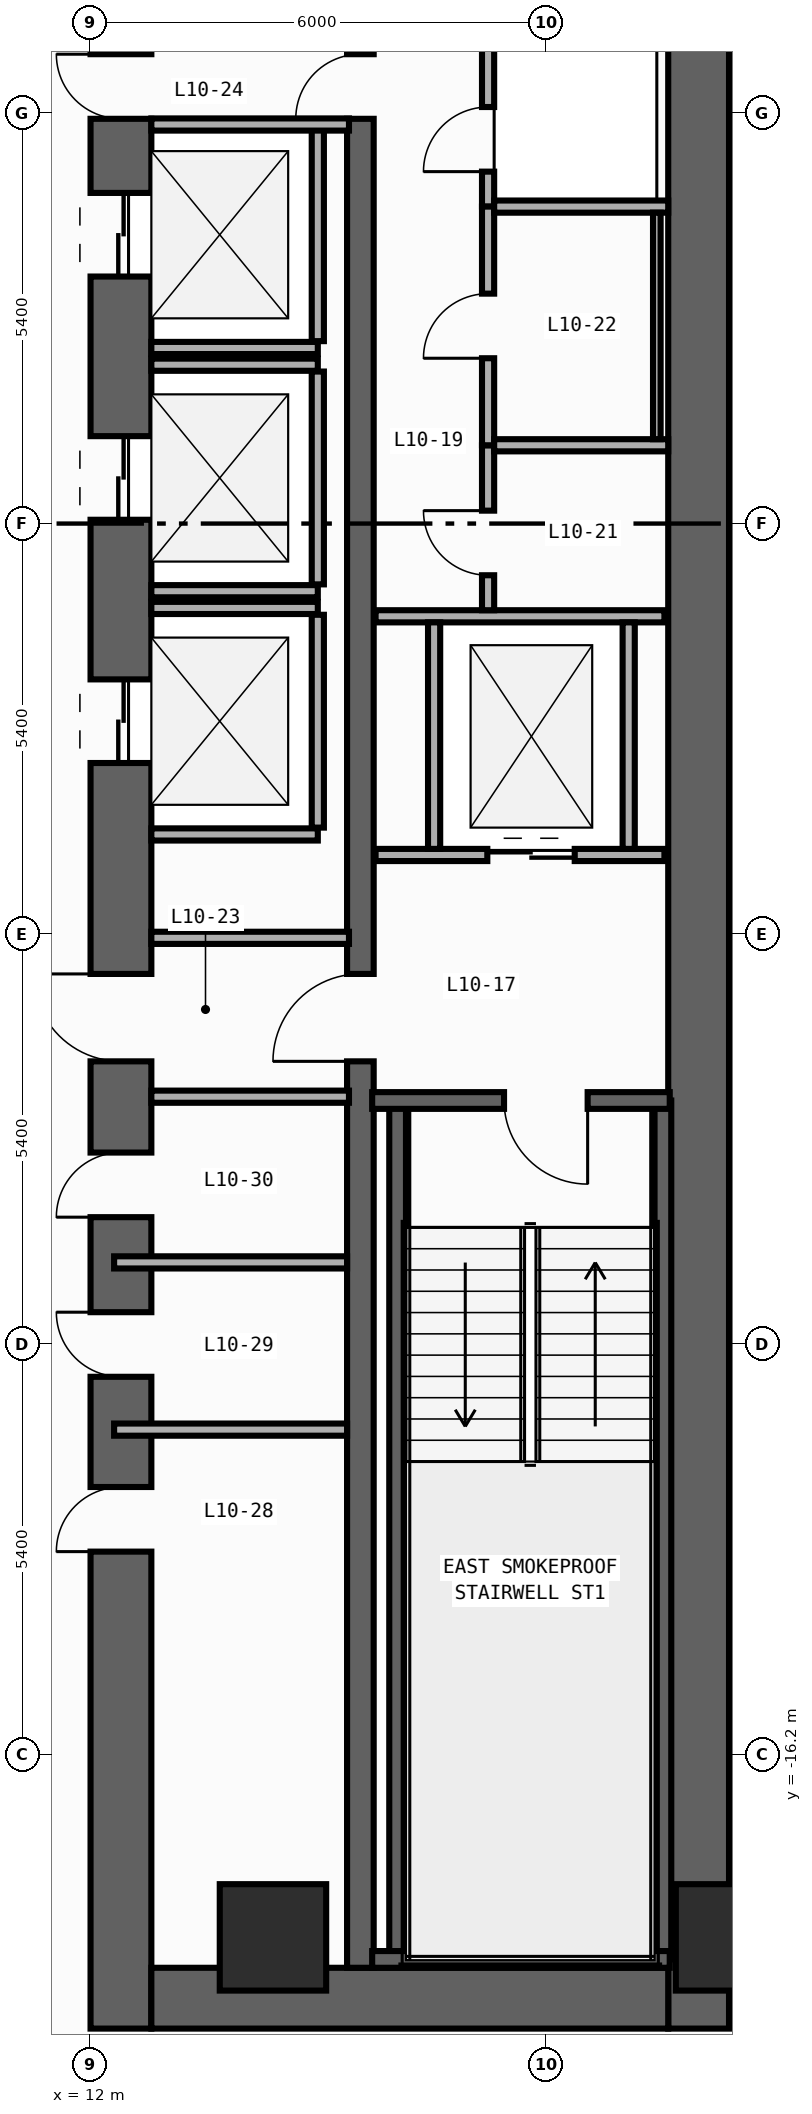
"""IFC4 building model, lengths in metres.
Left out: names, types, materials, properties, quantities, classifications, styles, units other than length and angle.
Written with IfcOpenShell. Run it as: python <this file> out.ifc"""

import sys

from ifc_helpers import new_model, si_unit, direction, frame, frame_2d, origin, origin_2d, place, context, subcontext, project, spatial, rectangle, extrude, element, fill, save


model = new_model("IFC4")
c1 = context("Model", 3, precision=1e-05, world=origin(), true_north=direction((0.0, 1.0)))
c2 = subcontext(c1, "Body", "Model", "MODEL_VIEW")
j1 = project(units=[si_unit("LENGTHUNIT", "METRE"), si_unit("PLANEANGLEUNIT", "RADIAN")], contexts=[c1])
p1 = place(None, origin())
s1 = spatial("IfcSite", under=j1, at=p1, CompositionType="ELEMENT")
p2 = place(p1, origin())
s2 = spatial("IfcBuilding", under=s1, at=p2, CompositionType="ELEMENT")
p3 = place(p2, frame((0.0, 0.0, 42.8)))
s3 = spatial("IfcBuildingStorey", under=s2, at=p3, CompositionType="ELEMENT", Elevation=42.8)
p4 = place(p3, frame((12.4, -19.8, 0.0), z_axis=(0.0, 0.0, 1.0), x_axis=(0.0, 1.0, 0.0)))
e1 = element("IfcWall", 1, at=p4, inside=s3, PredefinedType="SHEAR", context=c2, shape_type="SweptSolid", body=[
    extrude(rectangle(XDim=27.0, YDim=0.8, at=frame_2d((13.5, 0.0))), origin(), (0.0, 0.0, 1.0), 3.94),
])
p5 = place(p4, frame((23.05, 0.0, 0.0)))
e2 = element("IfcOpeningElement", 2, at=p5, cuts=e1, PredefinedType="OPENING", context=c2, shape_type="SweptSolid", body=[
    extrude(rectangle(XDim=1.1, YDim=2.2, at=frame_2d((0.55, 1.1))), frame((0.0, 0.41, 0.0), z_axis=(0.0, -1.0, 0.0), x_axis=(1.0, 0.0, 0.0)), (0.0, 0.0, 1.0), 0.82),
])
p6 = place(p4, frame((19.85, 0.0, 0.0)))
e3 = element("IfcOpeningElement", 3, at=p6, cuts=e1, PredefinedType="OPENING", context=c2, shape_type="SweptSolid", body=[
    extrude(rectangle(XDim=1.1, YDim=2.2, at=frame_2d((0.55, 1.1))), frame((0.0, 0.41, 0.0), z_axis=(0.0, -1.0, 0.0), x_axis=(1.0, 0.0, 0.0)), (0.0, 0.0, 1.0), 0.82),
])
p7 = place(p4, frame((16.65, 0.0, 0.0)))
e4 = element("IfcOpeningElement", 4, at=p7, cuts=e1, PredefinedType="OPENING", context=c2, shape_type="SweptSolid", body=[
    extrude(rectangle(XDim=1.1, YDim=2.2, at=frame_2d((0.55, 1.1))), frame((0.0, 0.41, 0.0), z_axis=(0.0, -1.0, 0.0), x_axis=(1.0, 0.0, 0.0)), (0.0, 0.0, 1.0), 0.82),
])
p8 = place(p4, frame((6.275, 0.0, 0.0)))
e5 = element("IfcOpeningElement", 5, at=p8, cuts=e1, PredefinedType="OPENING", context=c2, shape_type="SweptSolid", body=[
    extrude(rectangle(XDim=0.85, YDim=2.1, at=frame_2d((0.425, 1.05))), frame((0.0, 0.41, 0.0), z_axis=(0.0, -1.0, 0.0), x_axis=(1.0, 0.0, 0.0)), (0.0, 0.0, 1.0), 0.82),
])
p9 = place(p4, frame((8.575, 0.0, 0.0)))
e6 = element("IfcOpeningElement", 6, at=p9, cuts=e1, PredefinedType="OPENING", context=c2, shape_type="SweptSolid", body=[
    extrude(rectangle(XDim=0.85, YDim=2.1, at=frame_2d((0.425, 1.05))), frame((0.0, 0.41, 0.0), z_axis=(0.0, -1.0, 0.0), x_axis=(1.0, 0.0, 0.0)), (0.0, 0.0, 1.0), 0.82),
])
p10 = place(p4, frame((10.675, 0.0, 0.0)))
e7 = element("IfcOpeningElement", 7, at=p10, cuts=e1, PredefinedType="OPENING", context=c2, shape_type="SweptSolid", body=[
    extrude(rectangle(XDim=0.85, YDim=2.1, at=frame_2d((0.425, 1.05))), frame((0.0, 0.41, 0.0), z_axis=(0.0, -1.0, 0.0), x_axis=(1.0, 0.0, 0.0)), (0.0, 0.0, 1.0), 0.82),
])
p11 = place(p4, frame((12.725, 0.0, 0.0)))
e8 = element("IfcOpeningElement", 8, at=p11, cuts=e1, PredefinedType="OPENING", context=c2, shape_type="SweptSolid", body=[
    extrude(rectangle(XDim=1.15, YDim=2.2, at=frame_2d((0.575, 1.1))), frame((0.0, 0.41, 0.0), z_axis=(0.0, -1.0, 0.0), x_axis=(1.0, 0.0, 0.0)), (0.0, 0.0, 1.0), 0.82),
])
p12 = place(p4, frame((25.125, 0.0, 0.0)))
e9 = element("IfcOpeningElement", 9, at=p12, cuts=e1, PredefinedType="OPENING", context=c2, shape_type="SweptSolid", body=[
    extrude(rectangle(XDim=0.85, YDim=2.1, at=frame_2d((0.425, 1.05))), frame((0.0, 0.41, 0.0), z_axis=(0.0, -1.0, 0.0), x_axis=(1.0, 0.0, 0.0)), (0.0, 0.0, 1.0), 0.82),
])
p13 = place(p3, frame((20.0, -19.8, 0.0), z_axis=(0.0, 0.0, 1.0), x_axis=(0.0, 1.0, 0.0)))
e10 = element("IfcWall", 10, at=p13, inside=s3, PredefinedType="SHEAR", context=c2, shape_type="SweptSolid", body=[
    extrude(rectangle(XDim=27.0, YDim=0.8, at=frame_2d((13.5, 0.0))), origin(), (0.0, 0.0, 1.0), 3.94),
])
p14 = place(p3, frame((12.8, -19.4, 0.0), z_axis=(0.0, 0.0, 1.0), x_axis=(1.0, 0.0, 0.0)))
e11 = element("IfcWall", 11, at=p14, inside=s3, PredefinedType="SHEAR", context=c2, shape_type="SweptSolid", body=[
    extrude(rectangle(XDim=6.8, YDim=0.8, at=frame_2d((3.4, 0.0))), origin(), (0.0, 0.0, 1.0), 3.94),
])
p15 = place(p3, frame((15.55, -19.0, 0.0), z_axis=(0.0, 0.0, 1.0), x_axis=(0.0, 1.0, 0.0)))
e12 = element("IfcWall", 12, at=p15, inside=s3, PredefinedType="SHEAR", context=c2, shape_type="SweptSolid", body=[
    extrude(rectangle(XDim=25.4, YDim=0.35, at=frame_2d((12.7, 0.0))), origin(), (0.0, 0.0, 1.0), 3.94),
])
p16 = place(p15, frame((11.925, 0.0, 0.0)))
e13 = element("IfcOpeningElement", 13, at=p16, cuts=e12, PredefinedType="OPENING", context=c2, shape_type="SweptSolid", body=[
    extrude(rectangle(XDim=1.15, YDim=2.2, at=frame_2d((0.575, 1.1))), frame((0.0, 0.185, 0.0), z_axis=(0.0, -1.0, 0.0), x_axis=(1.0, 0.0, 0.0)), (0.0, 0.0, 1.0), 0.37),
])
p17 = place(p15, frame((24.325, 0.0, 0.0)))
e14 = element("IfcOpeningElement", 14, at=p17, cuts=e12, PredefinedType="OPENING", context=c2, shape_type="SweptSolid", body=[
    extrude(rectangle(XDim=0.85, YDim=2.1, at=frame_2d((0.425, 1.05))), frame((0.0, 0.185, 0.0), z_axis=(0.0, -1.0, 0.0), x_axis=(1.0, 0.0, 0.0)), (0.0, 0.0, 1.0), 0.37),
])
for number, where, z_axis, x_axis in (
    (15, (16.04, -18.89, 0.0), (0.0, 0.0, 1.0), (0.0, 1.0, 0.0)),
    (16, (19.53, -18.89, 0.0), (0.0, 0.0, 1.0), (0.0, 1.0, 0.0)),
):
    element("IfcWall", number, at=place(p3, frame(where, z_axis=z_axis, x_axis=x_axis)), inside=s3, PredefinedType="SHEAR", context=c2, shape_type="SweptSolid", body=[
        extrude(rectangle(XDim=11.3, YDim=0.22, at=frame_2d((5.65, 0.0))), origin(), (0.0, 0.0, 1.0), 3.94),
    ])
p18 = place(p3, frame((15.705, -18.89, 0.0), z_axis=(0.0, 0.0, 1.0), x_axis=(1.0, 0.0, 0.0)))
e17 = element("IfcWall", 17, at=p18, inside=s3, PredefinedType="SHEAR", context=c2, shape_type="SweptSolid", body=[
    extrude(rectangle(XDim=3.915, YDim=0.22, at=frame_2d((1.958, 0.0))), origin(), (0.0, 0.0, 1.0), 3.94),
])
p19 = place(p3, frame((19.62, -7.59, 0.0), z_axis=(0.0, 0.0, 1.0), x_axis=(-1.0, 0.0, 0.0)))
e18 = element("IfcWall", 18, at=p19, inside=s3, PredefinedType="SHEAR", context=c2, shape_type="SweptSolid", body=[
    extrude(rectangle(XDim=3.915, YDim=0.22, at=frame_2d((1.958, 0.0))), origin(), (0.0, 0.0, 1.0), 3.94),
])
p20 = place(p19, frame((1.08, 0.0, 0.0)))
e19 = element("IfcOpeningElement", 19, at=p20, cuts=e18, PredefinedType="OPENING", context=c2, shape_type="SweptSolid", body=[
    extrude(rectangle(XDim=1.1, YDim=2.2, at=frame_2d((0.55, 1.1))), frame((0.0, 0.12, 0.0), z_axis=(0.0, -1.0, 0.0), x_axis=(1.0, 0.0, 0.0)), (0.0, 0.0, 1.0), 0.24),
])
for number, where, z_axis, x_axis in (
    (20, (20.4, -18.6, 0.0), (0.0, 0.0, 1.0), (1.0, 0.0, 0.0)),
    (21, (14.4, -18.6, 0.0), (0.0, 0.0, 1.0), (1.0, 0.0, 0.0)),
):
    element("IfcColumn", number, at=place(p3, frame(where, z_axis=z_axis, x_axis=x_axis)), inside=s3, PredefinedType="COLUMN", context=c2, shape_type="SweptSolid", body=[
        extrude(rectangle(XDim=1.4, YDim=1.4, at=origin_2d()), origin(), (0.0, 0.0, 1.0), 4.2),
    ])
p21 = place(p3, frame((12.8, 2.31, 0.0), z_axis=(0.0, 0.0, 1.0), x_axis=(1.0, 0.0, 0.0)))
e22 = element("IfcWall", 22, at=p21, inside=s3, PredefinedType="STANDARD", context=c2, shape_type="SweptSolid", body=[
    extrude(rectangle(XDim=2.19, YDim=0.16, at=frame_2d((1.095, 0.0))), origin(), (0.0, 0.0, 1.0), 3.94),
])
p22 = place(p3, frame((14.99, 2.4, 0.0), z_axis=(0.0, 0.0, 1.0), x_axis=(0.0, 1.0, 0.0)))
e23 = element("IfcWall", 23, at=p22, inside=s3, PredefinedType="STANDARD", context=c2, shape_type="SweptSolid", body=[
    extrude(rectangle(XDim=2.8, YDim=0.16, at=frame_2d((1.4, 0.0))), origin(), (0.0, 0.0, 1.0), 3.94),
])
for number, where, z_axis, x_axis in (
    (24, (12.8, -0.89, 0.0), (0.0, 0.0, 1.0), (1.0, 0.0, 0.0)),
    (25, (12.8, 2.09, 0.0), (0.0, 0.0, 1.0), (1.0, 0.0, 0.0)),
):
    element("IfcWall", number, at=place(p3, frame(where, z_axis=z_axis, x_axis=x_axis)), inside=s3, PredefinedType="STANDARD", context=c2, shape_type="SweptSolid", body=[
        extrude(rectangle(XDim=2.19, YDim=0.16, at=frame_2d((1.095, 0.0))), origin(), (0.0, 0.0, 1.0), 3.94),
    ])
p23 = place(p3, frame((14.99, -0.8, 0.0), z_axis=(0.0, 0.0, 1.0), x_axis=(0.0, 1.0, 0.0)))
e26 = element("IfcWall", 26, at=p23, inside=s3, PredefinedType="STANDARD", context=c2, shape_type="SweptSolid", body=[
    extrude(rectangle(XDim=2.8, YDim=0.16, at=frame_2d((1.4, 0.0))), origin(), (0.0, 0.0, 1.0), 3.94),
])
for number, where, z_axis, x_axis in (
    (27, (12.8, -4.09, 0.0), (0.0, 0.0, 1.0), (1.0, 0.0, 0.0)),
    (28, (12.8, -1.11, 0.0), (0.0, 0.0, 1.0), (1.0, 0.0, 0.0)),
):
    element("IfcWall", number, at=place(p3, frame(where, z_axis=z_axis, x_axis=x_axis)), inside=s3, PredefinedType="STANDARD", context=c2, shape_type="SweptSolid", body=[
        extrude(rectangle(XDim=2.19, YDim=0.16, at=frame_2d((1.095, 0.0))), origin(), (0.0, 0.0, 1.0), 3.94),
    ])
p24 = place(p3, frame((14.99, -4.0, 0.0), z_axis=(0.0, 0.0, 1.0), x_axis=(0.0, 1.0, 0.0)))
e29 = element("IfcWall", 29, at=p24, inside=s3, PredefinedType="STANDARD", context=c2, shape_type="SweptSolid", body=[
    extrude(rectangle(XDim=2.8, YDim=0.16, at=frame_2d((1.4, 0.0))), origin(), (0.0, 0.0, 1.0), 3.94),
])
p25 = place(p3, frame((15.75, -4.36, 0.0), z_axis=(0.0, 0.0, 1.0), x_axis=(1.0, 0.0, 0.0)))
e30 = element("IfcWall", 30, at=p25, inside=s3, PredefinedType="STANDARD", context=c2, shape_type="SweptSolid", body=[
    extrude(rectangle(XDim=3.8, YDim=0.16, at=frame_2d((1.9, 0.0))), origin(), (0.0, 0.0, 1.0), 3.94),
])
p26 = place(p25, frame((1.47, 0.0, 0.0)))
e31 = element("IfcOpeningElement", 31, at=p26, cuts=e30, PredefinedType="OPENING", context=c2, shape_type="SweptSolid", body=[
    extrude(rectangle(XDim=1.15, YDim=2.2, at=frame_2d((0.575, 1.1))), frame((0.0, 0.09, 0.0), z_axis=(0.0, -1.0, 0.0), x_axis=(1.0, 0.0, 0.0)), (0.0, 0.0, 1.0), 0.18),
])
p27 = place(p3, frame((15.75, -1.22, 0.0), z_axis=(0.0, 0.0, 1.0), x_axis=(1.0, 0.0, 0.0)))
e32 = element("IfcWall", 32, at=p27, inside=s3, PredefinedType="STANDARD", context=c2, shape_type="SweptSolid", body=[
    extrude(rectangle(XDim=3.8, YDim=0.16, at=frame_2d((1.9, 0.0))), origin(), (0.0, 0.0, 1.0), 3.94),
])
for number, where, z_axis, x_axis in (
    (33, (16.52, -4.28, 0.0), (0.0, 0.0, 1.0), (0.0, 1.0, 0.0)),
    (34, (19.08, -4.28, 0.0), (0.0, 0.0, 1.0), (0.0, 1.0, 0.0)),
):
    element("IfcWall", number, at=place(p3, frame(where, z_axis=z_axis, x_axis=x_axis)), inside=s3, PredefinedType="STANDARD", context=c2, shape_type="SweptSolid", body=[
        extrude(rectangle(XDim=2.98, YDim=0.16, at=frame_2d((1.49, 0.0))), origin(), (0.0, 0.0, 1.0), 3.94),
    ])
for number, where, z_axis, x_axis in (
    (35, (12.8, -5.45, 0.0), (0.0, 0.0, 1.0), (1.0, 0.0, 0.0)),
    (36, (12.8, -7.54, 0.0), (0.0, 0.0, 1.0), (1.0, 0.0, 0.0)),
    (37, (12.8, 5.25, 0.0), (0.0, 0.0, 1.0), (1.0, 0.0, 0.0)),
):
    element("IfcWall", number, at=place(p3, frame(where, z_axis=z_axis, x_axis=x_axis)), inside=s3, PredefinedType="STANDARD", context=c2, shape_type="SweptSolid", body=[
        extrude(rectangle(XDim=2.6, YDim=0.16, at=frame_2d((1.3, 0.0))), origin(), (0.0, 0.0, 1.0), 3.94),
    ])
p28 = place(p3, frame((17.23, 4.17, 0.0), z_axis=(0.0, 0.0, 1.0), x_axis=(0.0, 1.0, 0.0)))
e38 = element("IfcWall", 38, at=p28, inside=s3, PredefinedType="PARTITIONING", context=c2, shape_type="SweptSolid", body=[
    extrude(rectangle(XDim=2.23, YDim=0.16, at=frame_2d((1.115, 0.0))), origin(), (0.0, 0.0, 1.0), 3.94),
])
p29 = place(p28, frame((0.46, 0.0, 0.0)))
e39 = element("IfcOpeningElement", 39, at=p29, cuts=e38, PredefinedType="OPENING", context=c2, shape_type="SweptSolid", body=[
    extrude(rectangle(XDim=0.85, YDim=2.1, at=frame_2d((0.425, 1.05))), frame((0.0, 0.09, 0.0), z_axis=(0.0, -1.0, 0.0), x_axis=(1.0, 0.0, 0.0)), (0.0, 0.0, 1.0), 0.18),
])
p30 = place(p3, frame((17.23, -1.14, 0.0), z_axis=(0.0, 0.0, 1.0), x_axis=(0.0, 1.0, 0.0)))
e40 = element("IfcWall", 40, at=p30, inside=s3, PredefinedType="PARTITIONING", context=c2, shape_type="SweptSolid", body=[
    extrude(rectangle(XDim=2.17, YDim=0.16, at=frame_2d((1.085, 0.0))), origin(), (0.0, 0.0, 1.0), 3.94),
])
p31 = place(p30, frame((0.46, 0.0, 0.0)))
e41 = element("IfcOpeningElement", 41, at=p31, cuts=e40, PredefinedType="OPENING", context=c2, shape_type="SweptSolid", body=[
    extrude(rectangle(XDim=0.85, YDim=2.1, at=frame_2d((0.425, 1.05))), frame((0.0, 0.09, 0.0), z_axis=(0.0, -1.0, 0.0), x_axis=(1.0, 0.0, 0.0)), (0.0, 0.0, 1.0), 0.18),
])
p32 = place(p3, frame((17.23, 1.03, 0.0), z_axis=(0.0, 0.0, 1.0), x_axis=(0.0, 1.0, 0.0)))
e42 = element("IfcWall", 42, at=p32, inside=s3, PredefinedType="PARTITIONING", context=c2, shape_type="SweptSolid", body=[
    extrude(rectangle(XDim=3.14, YDim=0.16, at=frame_2d((1.57, 0.0))), origin(), (0.0, 0.0, 1.0), 3.94),
])
p33 = place(p32, frame((1.145, 0.0, 0.0)))
e43 = element("IfcOpeningElement", 43, at=p33, cuts=e42, PredefinedType="OPENING", context=c2, shape_type="SweptSolid", body=[
    extrude(rectangle(XDim=0.85, YDim=2.1, at=frame_2d((0.425, 1.05))), frame((0.0, 0.09, 0.0), z_axis=(0.0, -1.0, 0.0), x_axis=(1.0, 0.0, 0.0)), (0.0, 0.0, 1.0), 0.18),
])
for number, where, z_axis, x_axis in (
    (44, (17.31, 4.17, 0.0), (0.0, 0.0, 1.0), (1.0, 0.0, 0.0)),
    (45, (17.31, 1.03, 0.0), (0.0, 0.0, 1.0), (1.0, 0.0, 0.0)),
):
    element("IfcWall", number, at=place(p3, frame(where, z_axis=z_axis, x_axis=x_axis)), inside=s3, PredefinedType="PARTITIONING", context=c2, shape_type="SweptSolid", body=[
        extrude(rectangle(XDim=2.29, YDim=0.16, at=frame_2d((1.145, 0.0))), origin(), (0.0, 0.0, 1.0), 3.94),
    ])
for number, where, z_axis, x_axis in (
    (46, (12.31, -11.92, 0.0), (0.0, 0.0, 1.0), (1.0, 0.0, 0.0)),
    (47, (12.31, -9.72, 0.0), (0.0, 0.0, 1.0), (1.0, 0.0, 0.0)),
):
    element("IfcWall", number, at=place(p3, frame(where, z_axis=z_axis, x_axis=x_axis)), inside=s3, PredefinedType="PARTITIONING", context=c2, shape_type="SweptSolid", body=[
        extrude(rectangle(XDim=3.065, YDim=0.16, at=frame_2d((1.532, 0.0))), origin(), (0.0, 0.0, 1.0), 3.94),
    ])
p34 = place(p3, frame((19.45, 4.09, 0.0), z_axis=(0.0, 0.0, 1.0), x_axis=(0.0, -1.0, 0.0)))
e48 = element("IfcWall", 48, at=p34, inside=s3, PredefinedType="PARTITIONING", context=c2, shape_type="SweptSolid", body=[
    extrude(rectangle(XDim=2.98, YDim=0.1, at=frame_2d((1.49, 0.0))), origin(), (0.0, 0.0, 1.0), 3.94),
])
p35 = place(p20, origin())
e49 = element("IfcDoor", 49, at=p35, inside=s3, OperationType="SINGLE_SWING_LEFT", PredefinedType="DOOR", context=c2, shape_type="SweptSolid", body=[
    extrude(rectangle(XDim=1.1, YDim=2.2, at=frame_2d((0.55, 1.1))), frame((0.0, 0.025, 0.0), z_axis=(0.0, -1.0, 0.0), x_axis=(1.0, 0.0, 0.0)), (0.0, 0.0, 1.0), 0.05),
])
fill(e19, e49)
p36 = place(p5, origin())
e50 = element("IfcDoor", 50, at=p36, inside=s3, OperationType="DOUBLE_DOOR_SLIDING", PredefinedType="DOOR", context=c2, shape_type="SweptSolid", body=[
    extrude(rectangle(XDim=1.1, YDim=2.2, at=frame_2d((0.55, 1.1))), frame((0.0, 0.025, 0.0), z_axis=(0.0, -1.0, 0.0), x_axis=(1.0, 0.0, 0.0)), (0.0, 0.0, 1.0), 0.05),
])
fill(e2, e50)
p37 = place(p6, origin())
e51 = element("IfcDoor", 51, at=p37, inside=s3, OperationType="DOUBLE_DOOR_SLIDING", PredefinedType="DOOR", context=c2, shape_type="SweptSolid", body=[
    extrude(rectangle(XDim=1.1, YDim=2.2, at=frame_2d((0.55, 1.1))), frame((0.0, 0.025, 0.0), z_axis=(0.0, -1.0, 0.0), x_axis=(1.0, 0.0, 0.0)), (0.0, 0.0, 1.0), 0.05),
])
fill(e3, e51)
p38 = place(p7, origin())
e52 = element("IfcDoor", 52, at=p38, inside=s3, OperationType="DOUBLE_DOOR_SLIDING", PredefinedType="DOOR", context=c2, shape_type="SweptSolid", body=[
    extrude(rectangle(XDim=1.1, YDim=2.2, at=frame_2d((0.55, 1.1))), frame((0.0, 0.025, 0.0), z_axis=(0.0, -1.0, 0.0), x_axis=(1.0, 0.0, 0.0)), (0.0, 0.0, 1.0), 0.05),
])
fill(e4, e52)
p39 = place(p8, origin())
e53 = element("IfcDoor", 53, at=p39, inside=s3, OperationType="SINGLE_SWING_LEFT", PredefinedType="DOOR", context=c2, shape_type="SweptSolid", body=[
    extrude(rectangle(XDim=0.85, YDim=2.1, at=frame_2d((0.425, 1.05))), frame((0.0, 0.025, 0.0), z_axis=(0.0, -1.0, 0.0), x_axis=(1.0, 0.0, 0.0)), (0.0, 0.0, 1.0), 0.05),
])
fill(e5, e53)
p40 = place(p9, origin())
e54 = element("IfcDoor", 54, at=p40, inside=s3, OperationType="SINGLE_SWING_RIGHT", PredefinedType="DOOR", context=c2, shape_type="SweptSolid", body=[
    extrude(rectangle(XDim=0.85, YDim=2.1, at=frame_2d((0.425, 1.05))), frame((0.0, 0.025, 0.0), z_axis=(0.0, -1.0, 0.0), x_axis=(1.0, 0.0, 0.0)), (0.0, 0.0, 1.0), 0.05),
])
fill(e6, e54)
p41 = place(p10, origin())
e55 = element("IfcDoor", 55, at=p41, inside=s3, OperationType="SINGLE_SWING_LEFT", PredefinedType="DOOR", context=c2, shape_type="SweptSolid", body=[
    extrude(rectangle(XDim=0.85, YDim=2.1, at=frame_2d((0.425, 1.05))), frame((0.0, 0.025, 0.0), z_axis=(0.0, -1.0, 0.0), x_axis=(1.0, 0.0, 0.0)), (0.0, 0.0, 1.0), 0.05),
])
fill(e7, e55)
p42 = place(p11, origin())
e56 = element("IfcDoor", 56, at=p42, inside=s3, OperationType="SINGLE_SWING_RIGHT", PredefinedType="DOOR", context=c2, shape_type="SweptSolid", body=[
    extrude(rectangle(XDim=1.15, YDim=2.2, at=frame_2d((0.575, 1.1))), frame((0.0, 0.025, 0.0), z_axis=(0.0, -1.0, 0.0), x_axis=(1.0, 0.0, 0.0)), (0.0, 0.0, 1.0), 0.05),
])
fill(e8, e56)
p43 = place(p16, origin())
e57 = element("IfcDoor", 57, at=p43, inside=s3, OperationType="SINGLE_SWING_LEFT", PredefinedType="DOOR", context=c2, shape_type="SweptSolid", body=[
    extrude(rectangle(XDim=1.15, YDim=2.2, at=frame_2d((0.575, 1.1))), frame((0.0, 0.025, 0.0), z_axis=(0.0, -1.0, 0.0), x_axis=(1.0, 0.0, 0.0)), (0.0, 0.0, 1.0), 0.05),
])
fill(e13, e57)
p44 = place(p12, origin())
e58 = element("IfcDoor", 58, at=p44, inside=s3, OperationType="SINGLE_SWING_RIGHT", PredefinedType="DOOR", context=c2, shape_type="SweptSolid", body=[
    extrude(rectangle(XDim=0.85, YDim=2.1, at=frame_2d((0.425, 1.05))), frame((0.0, 0.025, 0.0), z_axis=(0.0, -1.0, 0.0), x_axis=(1.0, 0.0, 0.0)), (0.0, 0.0, 1.0), 0.05),
])
fill(e9, e58)
p45 = place(p17, origin())
e59 = element("IfcDoor", 59, at=p45, inside=s3, OperationType="SINGLE_SWING_LEFT", PredefinedType="DOOR", context=c2, shape_type="SweptSolid", body=[
    extrude(rectangle(XDim=0.85, YDim=2.1, at=frame_2d((0.425, 1.05))), frame((0.0, 0.025, 0.0), z_axis=(0.0, -1.0, 0.0), x_axis=(1.0, 0.0, 0.0)), (0.0, 0.0, 1.0), 0.05),
])
fill(e14, e59)
p46 = place(p26, origin())
e60 = element("IfcDoor", 60, at=p46, inside=s3, OperationType="DOUBLE_DOOR_SLIDING", PredefinedType="DOOR", context=c2, shape_type="SweptSolid", body=[
    extrude(rectangle(XDim=1.15, YDim=2.2, at=frame_2d((0.575, 1.1))), frame((0.0, 0.025, 0.0), z_axis=(0.0, -1.0, 0.0), x_axis=(1.0, 0.0, 0.0)), (0.0, 0.0, 1.0), 0.05),
])
fill(e31, e60)
p47 = place(p29, origin())
e61 = element("IfcDoor", 61, at=p47, inside=s3, OperationType="SINGLE_SWING_LEFT", PredefinedType="DOOR", context=c2, shape_type="SweptSolid", body=[
    extrude(rectangle(XDim=0.85, YDim=2.1, at=frame_2d((0.425, 1.05))), frame((0.0, 0.025, 0.0), z_axis=(0.0, -1.0, 0.0), x_axis=(1.0, 0.0, 0.0)), (0.0, 0.0, 1.0), 0.05),
])
fill(e39, e61)
p48 = place(p31, origin())
e62 = element("IfcDoor", 62, at=p48, inside=s3, OperationType="SINGLE_SWING_RIGHT", PredefinedType="DOOR", context=c2, shape_type="SweptSolid", body=[
    extrude(rectangle(XDim=0.85, YDim=2.1, at=frame_2d((0.425, 1.05))), frame((0.0, 0.025, 0.0), z_axis=(0.0, -1.0, 0.0), x_axis=(1.0, 0.0, 0.0)), (0.0, 0.0, 1.0), 0.05),
])
fill(e41, e62)
p49 = place(p33, origin())
e63 = element("IfcDoor", 63, at=p49, inside=s3, OperationType="SINGLE_SWING_LEFT", PredefinedType="DOOR", context=c2, shape_type="SweptSolid", body=[
    extrude(rectangle(XDim=0.85, YDim=2.1, at=frame_2d((0.425, 1.05))), frame((0.0, 0.025, 0.0), z_axis=(0.0, -1.0, 0.0), x_axis=(1.0, 0.0, 0.0)), (0.0, 0.0, 1.0), 0.05),
])
fill(e43, e63)
save(model, sys.argv[1])
